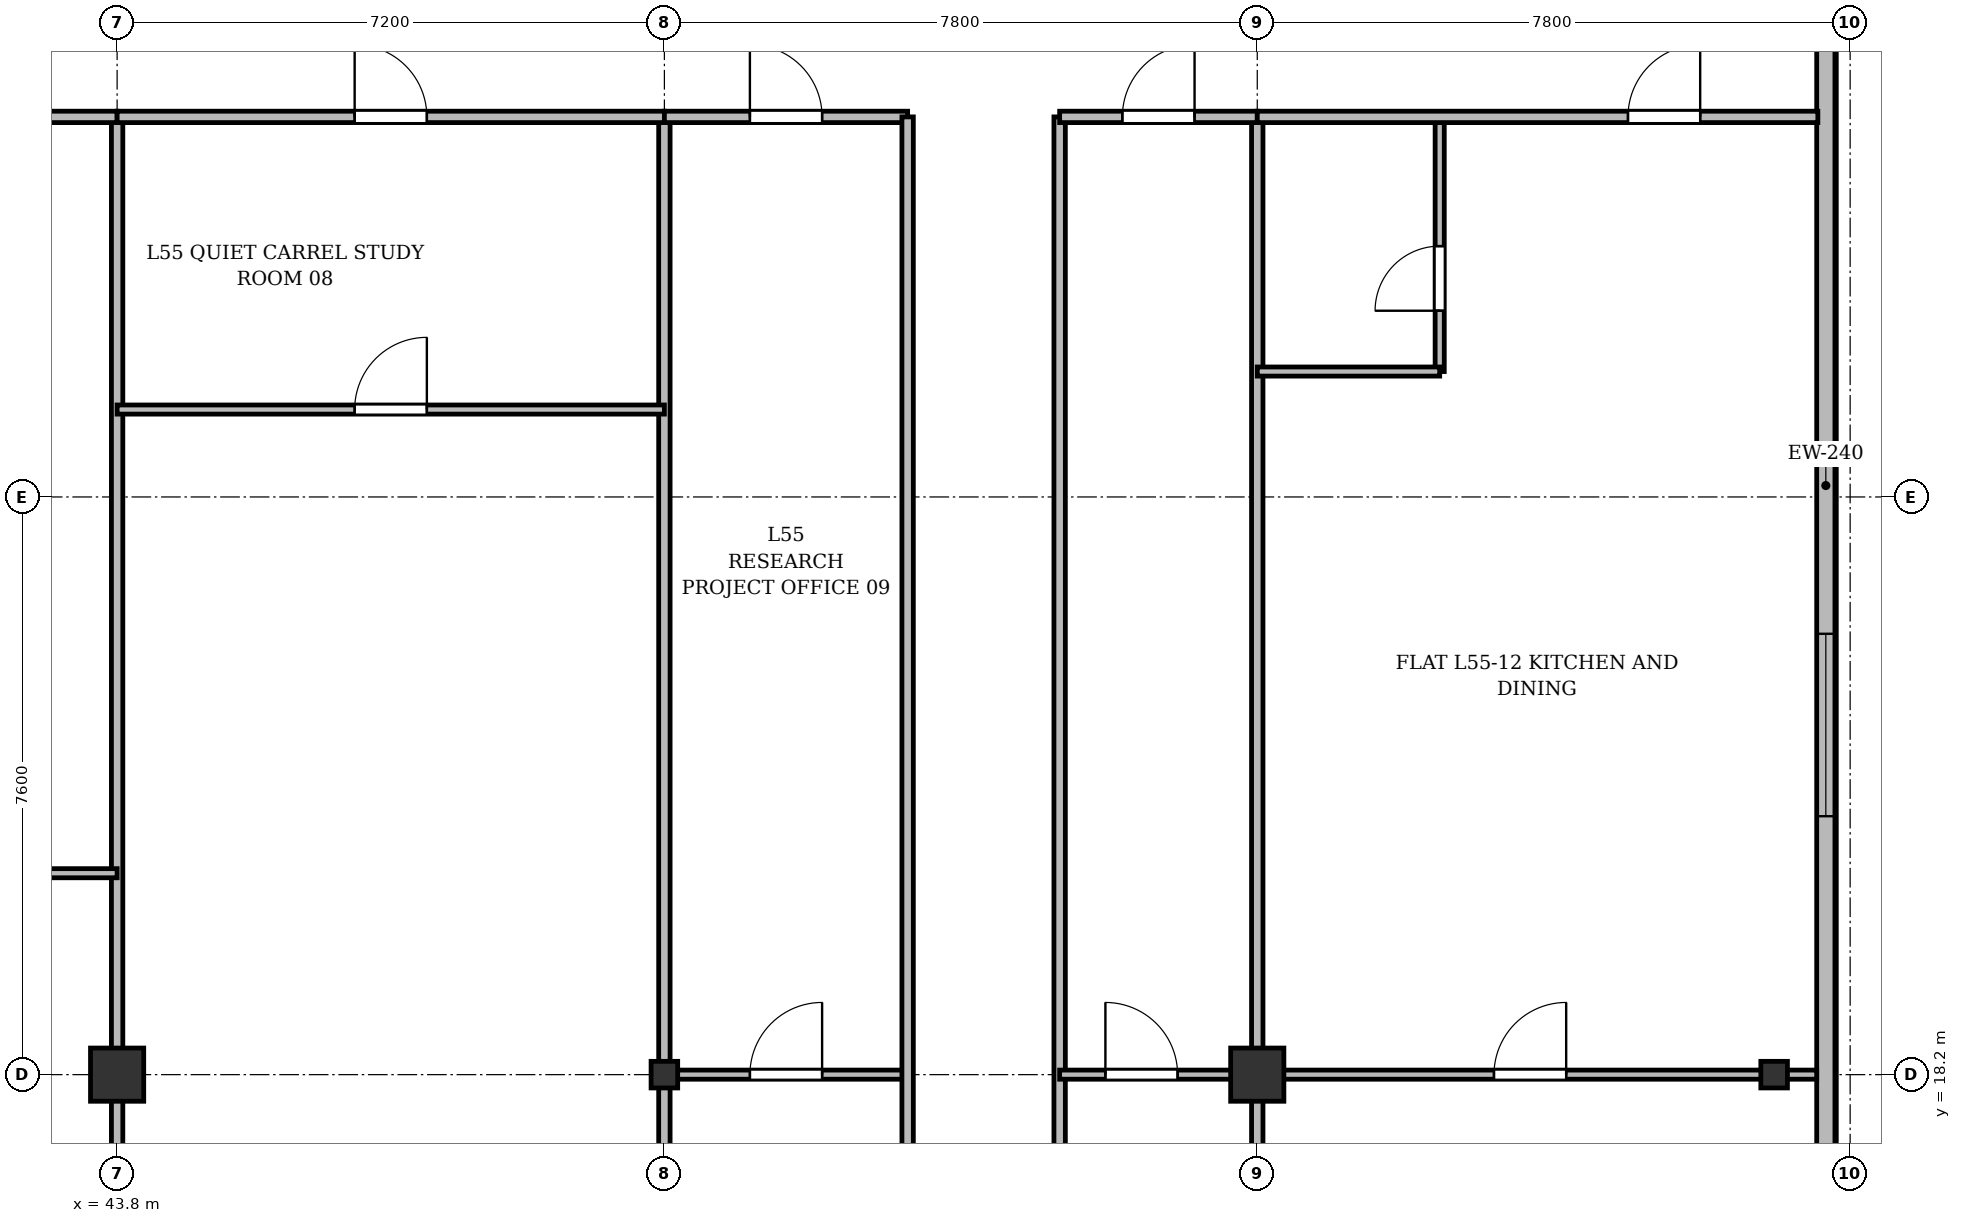
"""IFC4 building model, lengths in metres.
Left out: names, types, materials, properties, quantities, classifications, styles, units other than length and angle.
Written with IfcOpenShell. Run it as: python <this file> out.ifc"""

import sys

from ifc_helpers import new_model, si_unit, direction, frame, frame_2d, origin, origin_2d, place, context, subcontext, project, spatial, rectangle, i_section, extrude, source, transform, mapped, element, fill, save


model = new_model("IFC4")
c1 = context("Model", 3, precision=1e-05, world=origin(), true_north=direction((0.0, 1.0)))
c2 = subcontext(c1, "Body", "Model", "MODEL_VIEW")
j1 = project(units=[si_unit("LENGTHUNIT", "METRE"), si_unit("PLANEANGLEUNIT", "RADIAN")], contexts=[c1])
p1 = place(None, origin())
s1 = spatial("IfcSite", under=j1, at=p1, CompositionType="ELEMENT")
p2 = place(p1, origin())
s2 = spatial("IfcBuilding", under=s1, at=p2, CompositionType="ELEMENT")
p3 = place(p2, frame((0.0, 0.0, 212.1)))
s3 = spatial("IfcBuildingStorey", under=s2, at=p3, CompositionType="ELEMENT", Elevation=212.1)
m1 = source(origin(), c2, "Body", "SweptSolid", [
    extrude(rectangle(XDim=0.7, YDim=0.7, at=origin_2d()), origin(), (0.0, 0.0, 1.0), 3.6),
])
p4 = place(p3, frame((43.8, 18.2, 0.0), z_axis=(0.0, 0.0, 1.0), x_axis=(1.0, 0.0, 0.0)))
e1 = element("IfcColumn", 1, at=p4, inside=s3, PredefinedType="COLUMN", context=c2, shape_type="MappedRepresentation", body=[
    mapped(m1, transform((0.0, 0.0, 0.0), x_axis=(1.0, 0.0, 0.0), y_axis=(0.0, 1.0, 0.0), z_axis=(0.0, 0.0, 1.0), scale=1.0)),
])
m2 = source(origin(), c2, "Body", "SweptSolid", [
    extrude(i_section(OverallWidth=0.35, OverallDepth=0.35, WebThickness=0.018, FlangeThickness=0.028, at=origin_2d()), origin(), (0.0, 0.0, 1.0), 3.6),
])
p5 = place(p3, frame((51.0, 18.2, 0.0), z_axis=(0.0, 0.0, 1.0), x_axis=(1.0, 0.0, 0.0)))
e2 = element("IfcColumn", 2, at=p5, inside=s3, PredefinedType="COLUMN", context=c2, shape_type="MappedRepresentation", body=[
    mapped(m2, transform((0.0, 0.0, 0.0), x_axis=(1.0, 0.0, 0.0), y_axis=(0.0, 1.0, 0.0), z_axis=(0.0, 0.0, 1.0), scale=1.0)),
])
p6 = place(p3, frame((58.8, 18.2, 0.0), z_axis=(0.0, 0.0, 1.0), x_axis=(1.0, 0.0, 0.0)))
e3 = element("IfcColumn", 3, at=p6, inside=s3, PredefinedType="COLUMN", context=c2, shape_type="MappedRepresentation", body=[
    mapped(m1, transform((0.0, 0.0, 0.0), x_axis=(1.0, 0.0, 0.0), y_axis=(0.0, 1.0, 0.0), z_axis=(0.0, 0.0, 1.0), scale=1.0)),
])
p7 = place(p3, frame((65.6, 18.2, 0.0), z_axis=(0.0, 0.0, 1.0), x_axis=(1.0, 0.0, 0.0)))
e4 = element("IfcColumn", 4, at=p7, inside=s3, PredefinedType="COLUMN", context=c2, shape_type="MappedRepresentation", body=[
    mapped(m2, transform((0.0, 0.0, 0.0), x_axis=(1.0, 0.0, 0.0), y_axis=(0.0, 1.0, 0.0), z_axis=(0.0, 0.0, 1.0), scale=1.0)),
])
p8 = place(p3, frame((66.28, 45.5, 0.0), z_axis=(0.0, 0.0, 1.0), x_axis=(0.0, -1.0, 0.0)))
e5 = element("IfcWall", 5, at=p8, inside=s3, PredefinedType="SOLIDWALL", context=c2, shape_type="SweptSolid", body=[
    extrude(rectangle(XDim=39.1, YDim=0.24, at=frame_2d((19.55, 0.0))), origin(), (0.0, 0.0, 1.0), 3.36),
])
p9 = place(p8, frame((36.45, 0.0, 0.92)))
e6 = element("IfcOpeningElement", 6, at=p9, cuts=e5, PredefinedType="OPENING", context=c2, shape_type="SweptSolid", body=[
    extrude(rectangle(XDim=1.2, YDim=1.65, at=frame_2d((0.6, 0.825))), frame((0.0, 0.13, 0.0), z_axis=(0.0, -1.0, 0.0), x_axis=(1.0, 0.0, 0.0)), (0.0, 0.0, 1.0), 0.26),
])
p10 = place(p8, frame((32.9, 0.0, 0.92)))
e7 = element("IfcOpeningElement", 7, at=p10, cuts=e5, PredefinedType="OPENING", context=c2, shape_type="SweptSolid", body=[
    extrude(rectangle(XDim=2.4, YDim=2.1, at=frame_2d((1.2, 1.05))), frame((0.0, 0.13, 0.0), z_axis=(0.0, -1.0, 0.0), x_axis=(1.0, 0.0, 0.0)), (0.0, 0.0, 1.0), 0.26),
])
p11 = place(p8, frame((28.7, 0.0, 0.92)))
e8 = element("IfcOpeningElement", 8, at=p11, cuts=e5, PredefinedType="OPENING", context=c2, shape_type="SweptSolid", body=[
    extrude(rectangle(XDim=2.4, YDim=2.1, at=frame_2d((1.2, 1.05))), frame((0.0, 0.13, 0.0), z_axis=(0.0, -1.0, 0.0), x_axis=(1.0, 0.0, 0.0)), (0.0, 0.0, 1.0), 0.26),
])
p12 = place(p8, frame((21.5, 0.0, 0.92)))
e9 = element("IfcOpeningElement", 9, at=p12, cuts=e5, PredefinedType="OPENING", context=c2, shape_type="SweptSolid", body=[
    extrude(rectangle(XDim=2.4, YDim=2.1, at=frame_2d((1.2, 1.05))), frame((0.0, 0.13, 0.0), z_axis=(0.0, -1.0, 0.0), x_axis=(1.0, 0.0, 0.0)), (0.0, 0.0, 1.0), 0.26),
])
p13 = place(p8, frame((7.5, 0.0, 0.92)))
e10 = element("IfcOpeningElement", 10, at=p13, cuts=e5, PredefinedType="OPENING", context=c2, shape_type="SweptSolid", body=[
    extrude(rectangle(XDim=2.4, YDim=2.1, at=frame_2d((1.2, 1.05))), frame((0.0, 0.13, 0.0), z_axis=(0.0, -1.0, 0.0), x_axis=(1.0, 0.0, 0.0)), (0.0, 0.0, 1.0), 0.26),
])
p14 = place(p8, frame((4.5, 0.0, 0.92)))
e11 = element("IfcOpeningElement", 11, at=p14, cuts=e5, PredefinedType="OPENING", context=c2, shape_type="SweptSolid", body=[
    extrude(rectangle(XDim=1.2, YDim=1.65, at=frame_2d((0.6, 0.825))), frame((0.0, 0.13, 0.0), z_axis=(0.0, -1.0, 0.0), x_axis=(1.0, 0.0, 0.0)), (0.0, 0.0, 1.0), 0.26),
])
p15 = place(p8, frame((1.15, 0.0, 0.92)))
e12 = element("IfcOpeningElement", 12, at=p15, cuts=e5, PredefinedType="OPENING", context=c2, shape_type="SweptSolid", body=[
    extrude(rectangle(XDim=1.2, YDim=1.65, at=frame_2d((0.6, 0.825))), frame((0.0, 0.13, 0.0), z_axis=(0.0, -1.0, 0.0), x_axis=(1.0, 0.0, 0.0)), (0.0, 0.0, 1.0), 0.26),
])
for number, where, z_axis, x_axis in (
    (13, (43.8, 3.625, 0.0), (0.0, 0.0, 1.0), (0.0, 1.0, 0.0)),
    (14, (51.0, 3.625, 0.0), (0.0, 0.0, 1.0), (0.0, 1.0, 0.0)),
    (15, (58.8, 3.625, 0.0), (0.0, 0.0, 1.0), (0.0, 1.0, 0.0)),
):
    element("IfcWall", number, at=place(p3, frame(where, z_axis=z_axis, x_axis=x_axis)), inside=s3, PredefinedType="PARTITIONING", context=c2, shape_type="SweptSolid", body=[
        extrude(rectangle(XDim=27.175, YDim=0.15, at=frame_2d((13.587, 0.0))), origin(), (0.0, 0.0, 1.0), 2.86),
    ])
p16 = place(p3, frame((35.8, 20.85, 0.0), z_axis=(0.0, 0.0, 1.0), x_axis=(1.0, 0.0, 0.0)))
e16 = element("IfcWall", 16, at=p16, inside=s3, PredefinedType="PARTITIONING", context=c2, shape_type="SweptSolid", body=[
    extrude(rectangle(XDim=8.0, YDim=0.12, at=frame_2d((4.0, 0.0))), origin(), (0.0, 0.0, 1.0), 2.86),
])
p17 = place(p16, frame((3.525, 0.0, 0.0)))
e17 = element("IfcOpeningElement", 17, at=p17, cuts=e16, PredefinedType="OPENING", context=c2, shape_type="SweptSolid", body=[
    extrude(rectangle(XDim=0.95, YDim=2.15, at=frame_2d((0.475, 1.075))), frame((0.0, 0.07, 0.0), z_axis=(0.0, -1.0, 0.0), x_axis=(1.0, 0.0, 0.0)), (0.0, 0.0, 1.0), 0.14),
])
p18 = place(p3, frame((35.8, 30.8, 0.0), z_axis=(0.0, 0.0, 1.0), x_axis=(1.0, 0.0, 0.0)))
e18 = element("IfcWall", 18, at=p18, inside=s3, PredefinedType="PARTITIONING", context=c2, shape_type="SweptSolid", body=[
    extrude(rectangle(XDim=8.0, YDim=0.15, at=frame_2d((4.0, 0.0))), origin(), (0.0, 0.0, 1.0), 2.86),
])
p19 = place(p18, frame((5.367, 0.0, 0.0)))
e19 = element("IfcOpeningElement", 19, at=p19, cuts=e18, PredefinedType="OPENING", context=c2, shape_type="SweptSolid", body=[
    extrude(rectangle(XDim=0.95, YDim=2.15, at=frame_2d((0.475, 1.075))), frame((0.0, 0.085, 0.0), z_axis=(0.0, -1.0, 0.0), x_axis=(1.0, 0.0, 0.0)), (0.0, 0.0, 1.0), 0.17),
])
p20 = place(p3, frame((43.8, 30.8, 0.0), z_axis=(0.0, 0.0, 1.0), x_axis=(1.0, 0.0, 0.0)))
e20 = element("IfcWall", 20, at=p20, inside=s3, PredefinedType="PARTITIONING", context=c2, shape_type="SweptSolid", body=[
    extrude(rectangle(XDim=7.2, YDim=0.15, at=frame_2d((3.6, 0.0))), origin(), (0.0, 0.0, 1.0), 2.86),
])
p21 = place(p20, frame((3.125, 0.0, 0.0)))
e21 = element("IfcOpeningElement", 21, at=p21, cuts=e20, PredefinedType="OPENING", context=c2, shape_type="SweptSolid", body=[
    extrude(rectangle(XDim=0.95, YDim=2.15, at=frame_2d((0.475, 1.075))), frame((0.0, 0.085, 0.0), z_axis=(0.0, -1.0, 0.0), x_axis=(1.0, 0.0, 0.0)), (0.0, 0.0, 1.0), 0.17),
])
p22 = place(p3, frame((43.8, 26.95, 0.0), z_axis=(0.0, 0.0, 1.0), x_axis=(1.0, 0.0, 0.0)))
e22 = element("IfcWall", 22, at=p22, inside=s3, PredefinedType="PARTITIONING", context=c2, shape_type="SweptSolid", body=[
    extrude(rectangle(XDim=7.2, YDim=0.12, at=frame_2d((3.6, 0.0))), origin(), (0.0, 0.0, 1.0), 2.86),
])
p23 = place(p22, frame((3.125, 0.0, 0.0)))
e23 = element("IfcOpeningElement", 23, at=p23, cuts=e22, PredefinedType="OPENING", context=c2, shape_type="SweptSolid", body=[
    extrude(rectangle(XDim=0.95, YDim=2.15, at=frame_2d((0.475, 1.075))), frame((0.0, 0.07, 0.0), z_axis=(0.0, -1.0, 0.0), x_axis=(1.0, 0.0, 0.0)), (0.0, 0.0, 1.0), 0.14),
])
p24 = place(p3, frame((51.0, 30.8, 0.0), z_axis=(0.0, 0.0, 1.0), x_axis=(1.0, 0.0, 0.0)))
e24 = element("IfcWall", 24, at=p24, inside=s3, PredefinedType="PARTITIONING", context=c2, shape_type="SweptSolid", body=[
    extrude(rectangle(XDim=3.2, YDim=0.15, at=frame_2d((1.6, 0.0))), origin(), (0.0, 0.0, 1.0), 2.86),
])
p25 = place(p24, frame((1.125, 0.0, 0.0)))
e25 = element("IfcOpeningElement", 25, at=p25, cuts=e24, PredefinedType="OPENING", context=c2, shape_type="SweptSolid", body=[
    extrude(rectangle(XDim=0.95, YDim=2.15, at=frame_2d((0.475, 1.075))), frame((0.0, 0.085, 0.0), z_axis=(0.0, -1.0, 0.0), x_axis=(1.0, 0.0, 0.0)), (0.0, 0.0, 1.0), 0.17),
])
p26 = place(p3, frame((51.0, 18.2, 0.0), z_axis=(0.0, 0.0, 1.0), x_axis=(1.0, 0.0, 0.0)))
e26 = element("IfcWall", 26, at=p26, inside=s3, PredefinedType="PARTITIONING", context=c2, shape_type="SweptSolid", body=[
    extrude(rectangle(XDim=3.2, YDim=0.12, at=frame_2d((1.6, 0.0))), origin(), (0.0, 0.0, 1.0), 2.91),
])
p27 = place(p26, frame((1.125, 0.0, 0.0)))
e27 = element("IfcOpeningElement", 27, at=p27, cuts=e26, PredefinedType="OPENING", context=c2, shape_type="SweptSolid", body=[
    extrude(rectangle(XDim=0.95, YDim=2.15, at=frame_2d((0.475, 1.075))), frame((0.0, 0.07, 0.0), z_axis=(0.0, -1.0, 0.0), x_axis=(1.0, 0.0, 0.0)), (0.0, 0.0, 1.0), 0.14),
])
for number, where, z_axis, x_axis in (
    (28, (54.2, 3.625, 0.0), (0.0, 0.0, 1.0), (0.0, 1.0, 0.0)),
    (29, (56.2, 3.625, 0.0), (0.0, 0.0, 1.0), (0.0, 1.0, 0.0)),
):
    element("IfcWall", number, at=place(p3, frame(where, z_axis=z_axis, x_axis=x_axis)), inside=s3, PredefinedType="PARTITIONING", context=c2, shape_type="SweptSolid", body=[
        extrude(rectangle(XDim=27.175, YDim=0.15, at=frame_2d((13.587, 0.0))), origin(), (0.0, 0.0, 1.0), 2.91),
    ])
p28 = place(p3, frame((56.2, 30.8, 0.0), z_axis=(0.0, 0.0, 1.0), x_axis=(1.0, 0.0, 0.0)))
e30 = element("IfcWall", 30, at=p28, inside=s3, PredefinedType="PARTITIONING", context=c2, shape_type="SweptSolid", body=[
    extrude(rectangle(XDim=2.6, YDim=0.15, at=frame_2d((1.3, 0.0))), origin(), (0.0, 0.0, 1.0), 2.86),
])
p29 = place(p28, frame((0.825, 0.0, 0.0)))
e31 = element("IfcOpeningElement", 31, at=p29, cuts=e30, PredefinedType="OPENING", context=c2, shape_type="SweptSolid", body=[
    extrude(rectangle(XDim=0.95, YDim=2.15, at=frame_2d((0.475, 1.075))), frame((0.0, 0.085, 0.0), z_axis=(0.0, -1.0, 0.0), x_axis=(1.0, 0.0, 0.0)), (0.0, 0.0, 1.0), 0.17),
])
p30 = place(p3, frame((56.2, 18.2, 0.0), z_axis=(0.0, 0.0, 1.0), x_axis=(1.0, 0.0, 0.0)))
e32 = element("IfcWall", 32, at=p30, inside=s3, PredefinedType="PARTITIONING", context=c2, shape_type="SweptSolid", body=[
    extrude(rectangle(XDim=2.6, YDim=0.12, at=frame_2d((1.3, 0.0))), origin(), (0.0, 0.0, 1.0), 2.91),
])
p31 = place(p30, frame((0.602, 0.0, 0.0)))
e33 = element("IfcOpeningElement", 33, at=p31, cuts=e32, PredefinedType="OPENING", context=c2, shape_type="SweptSolid", body=[
    extrude(rectangle(XDim=0.95, YDim=2.15, at=frame_2d((0.475, 1.075))), frame((0.0, 0.07, 0.0), z_axis=(0.0, -1.0, 0.0), x_axis=(1.0, 0.0, 0.0)), (0.0, 0.0, 1.0), 0.14),
])
p32 = place(p3, frame((58.8, 18.2, 0.0), z_axis=(0.0, 0.0, 1.0), x_axis=(1.0, 0.0, 0.0)))
e34 = element("IfcWall", 34, at=p32, inside=s3, PredefinedType="PARTITIONING", context=c2, shape_type="SweptSolid", body=[
    extrude(rectangle(XDim=7.36, YDim=0.12, at=frame_2d((3.68, 0.0))), origin(), (0.0, 0.0, 1.0), 2.91),
])
p33 = place(p32, frame((3.114, 0.0, 0.0)))
e35 = element("IfcOpeningElement", 35, at=p33, cuts=e34, PredefinedType="OPENING", context=c2, shape_type="SweptSolid", body=[
    extrude(rectangle(XDim=0.95, YDim=2.15, at=frame_2d((0.475, 1.075))), frame((0.0, 0.07, 0.0), z_axis=(0.0, -1.0, 0.0), x_axis=(1.0, 0.0, 0.0)), (0.0, 0.0, 1.0), 0.14),
])
p34 = place(p3, frame((61.2, 27.45, 0.0), z_axis=(0.0, 0.0, 1.0), x_axis=(0.0, 1.0, 0.0)))
e36 = element("IfcWall", 36, at=p34, inside=s3, PredefinedType="PARTITIONING", context=c2, shape_type="SweptSolid", body=[
    extrude(rectangle(XDim=3.35, YDim=0.12, at=frame_2d((1.675, 0.0))), origin(), (0.0, 0.0, 1.0), 3.36),
])
p35 = place(p34, frame((0.8, 0.0, 0.0)))
e37 = element("IfcOpeningElement", 37, at=p35, cuts=e36, PredefinedType="OPENING", context=c2, shape_type="SweptSolid", body=[
    extrude(rectangle(XDim=0.85, YDim=2.1, at=frame_2d((0.425, 1.05))), frame((0.0, 0.07, 0.0), z_axis=(0.0, -1.0, 0.0), x_axis=(1.0, 0.0, 0.0)), (0.0, 0.0, 1.0), 0.14),
])
p36 = place(p3, frame((58.8, 27.45, 0.0), z_axis=(0.0, 0.0, 1.0), x_axis=(1.0, 0.0, 0.0)))
e38 = element("IfcWall", 38, at=p36, inside=s3, PredefinedType="PARTITIONING", context=c2, shape_type="SweptSolid", body=[
    extrude(rectangle(XDim=2.4, YDim=0.12, at=frame_2d((1.2, 0.0))), origin(), (0.0, 0.0, 1.0), 2.86),
])
p37 = place(p3, frame((58.8, 30.8, 0.0), z_axis=(0.0, 0.0, 1.0), x_axis=(1.0, 0.0, 0.0)))
e39 = element("IfcWall", 39, at=p37, inside=s3, PredefinedType="PARTITIONING", context=c2, shape_type="SweptSolid", body=[
    extrude(rectangle(XDim=7.375, YDim=0.15, at=frame_2d((3.688, 0.0))), origin(), (0.0, 0.0, 1.0), 2.86),
])
p38 = place(p37, frame((4.877, 0.0, 0.0)))
e40 = element("IfcOpeningElement", 40, at=p38, cuts=e39, PredefinedType="OPENING", context=c2, shape_type="SweptSolid", body=[
    extrude(rectangle(XDim=0.95, YDim=2.15, at=frame_2d((0.475, 1.075))), frame((0.0, 0.085, 0.0), z_axis=(0.0, -1.0, 0.0), x_axis=(1.0, 0.0, 0.0)), (0.0, 0.0, 1.0), 0.17),
])
m3 = source(origin(), c2, "Body", "SweptSolid", [
    extrude(rectangle(XDim=2.4, YDim=2.1, at=frame_2d((1.2, 1.05))), frame((0.0, 0.03, 0.0), z_axis=(0.0, -1.0, 0.0), x_axis=(1.0, 0.0, 0.0)), (0.0, 0.0, 1.0), 0.06),
])
p39 = place(p12, origin())
e41 = element("IfcWindow", 41, at=p39, inside=s3, PartitioningType="SINGLE_PANEL", PredefinedType="WINDOW", context=c2, shape_type="MappedRepresentation", body=[
    mapped(m3, transform((0.0, 0.0, 0.0), x_axis=(1.0, 0.0, 0.0), y_axis=(0.0, 1.0, 0.0), z_axis=(0.0, 0.0, 1.0), scale=1.0)),
])
fill(e9, e41)
m4 = source(origin(), c2, "Body", "SweptSolid", [
    extrude(rectangle(XDim=0.95, YDim=2.15, at=frame_2d((0.475, 1.075))), frame((0.0, 0.025, 0.0), z_axis=(0.0, -1.0, 0.0), x_axis=(1.0, 0.0, 0.0)), (0.0, 0.0, 1.0), 0.05),
])
p40 = place(p21, origin())
e42 = element("IfcDoor", 42, at=p40, inside=s3, OperationType="SINGLE_SWING_LEFT", PredefinedType="DOOR", context=c2, shape_type="MappedRepresentation", body=[
    mapped(m4, transform((0.0, 0.0, 0.0), x_axis=(1.0, 0.0, 0.0), y_axis=(0.0, 1.0, 0.0), z_axis=(0.0, 0.0, 1.0), scale=1.0)),
])
fill(e21, e42)
p41 = place(p23, origin())
e43 = element("IfcDoor", 43, at=p41, inside=s3, OperationType="SINGLE_SWING_RIGHT", PredefinedType="DOOR", context=c2, shape_type="MappedRepresentation", body=[
    mapped(m4, transform((0.0, 0.0, 0.0), x_axis=(1.0, 0.0, 0.0), y_axis=(0.0, 1.0, 0.0), z_axis=(0.0, 0.0, 1.0), scale=1.0)),
])
fill(e23, e43)
p42 = place(p25, origin())
e44 = element("IfcDoor", 44, at=p42, inside=s3, OperationType="SINGLE_SWING_LEFT", PredefinedType="DOOR", context=c2, shape_type="MappedRepresentation", body=[
    mapped(m4, transform((0.0, 0.0, 0.0), x_axis=(1.0, 0.0, 0.0), y_axis=(0.0, 1.0, 0.0), z_axis=(0.0, 0.0, 1.0), scale=1.0)),
])
fill(e25, e44)
p43 = place(p27, origin())
e45 = element("IfcDoor", 45, at=p43, inside=s3, OperationType="SINGLE_SWING_RIGHT", PredefinedType="DOOR", context=c2, shape_type="MappedRepresentation", body=[
    mapped(m4, transform((0.0, 0.0, 0.0), x_axis=(1.0, 0.0, 0.0), y_axis=(0.0, 1.0, 0.0), z_axis=(0.0, 0.0, 1.0), scale=1.0)),
])
fill(e27, e45)
p44 = place(p29, origin())
e46 = element("IfcDoor", 46, at=p44, inside=s3, OperationType="SINGLE_SWING_RIGHT", PredefinedType="DOOR", context=c2, shape_type="MappedRepresentation", body=[
    mapped(m4, transform((0.0, 0.0, 0.0), x_axis=(1.0, 0.0, 0.0), y_axis=(0.0, 1.0, 0.0), z_axis=(0.0, 0.0, 1.0), scale=1.0)),
])
fill(e31, e46)
p45 = place(p31, origin())
e47 = element("IfcDoor", 47, at=p45, inside=s3, OperationType="SINGLE_SWING_LEFT", PredefinedType="DOOR", context=c2, shape_type="MappedRepresentation", body=[
    mapped(m4, transform((0.0, 0.0, 0.0), x_axis=(1.0, 0.0, 0.0), y_axis=(0.0, 1.0, 0.0), z_axis=(0.0, 0.0, 1.0), scale=1.0)),
])
fill(e33, e47)
p46 = place(p33, origin())
e48 = element("IfcDoor", 48, at=p46, inside=s3, OperationType="SINGLE_SWING_RIGHT", PredefinedType="DOOR", context=c2, shape_type="MappedRepresentation", body=[
    mapped(m4, transform((0.0, 0.0, 0.0), x_axis=(1.0, 0.0, 0.0), y_axis=(0.0, 1.0, 0.0), z_axis=(0.0, 0.0, 1.0), scale=1.0)),
])
fill(e35, e48)
m5 = source(origin(), c2, "Body", "SweptSolid", [
    extrude(rectangle(XDim=0.85, YDim=2.1, at=frame_2d((0.425, 1.05))), frame((0.0, 0.025, 0.0), z_axis=(0.0, -1.0, 0.0), x_axis=(1.0, 0.0, 0.0)), (0.0, 0.0, 1.0), 0.05),
])
p47 = place(p35, origin())
e49 = element("IfcDoor", 49, at=p47, inside=s3, OperationType="SINGLE_SWING_LEFT", PredefinedType="DOOR", context=c2, shape_type="MappedRepresentation", body=[
    mapped(m5, transform((0.0, 0.0, 0.0), x_axis=(1.0, 0.0, 0.0), y_axis=(0.0, 1.0, 0.0), z_axis=(0.0, 0.0, 1.0), scale=1.0)),
])
fill(e37, e49)
p48 = place(p38, origin())
e50 = element("IfcDoor", 50, at=p48, inside=s3, OperationType="SINGLE_SWING_RIGHT", PredefinedType="DOOR", context=c2, shape_type="MappedRepresentation", body=[
    mapped(m4, transform((0.0, 0.0, 0.0), x_axis=(1.0, 0.0, 0.0), y_axis=(0.0, 1.0, 0.0), z_axis=(0.0, 0.0, 1.0), scale=1.0)),
])
fill(e40, e50)
save(model, sys.argv[1])
